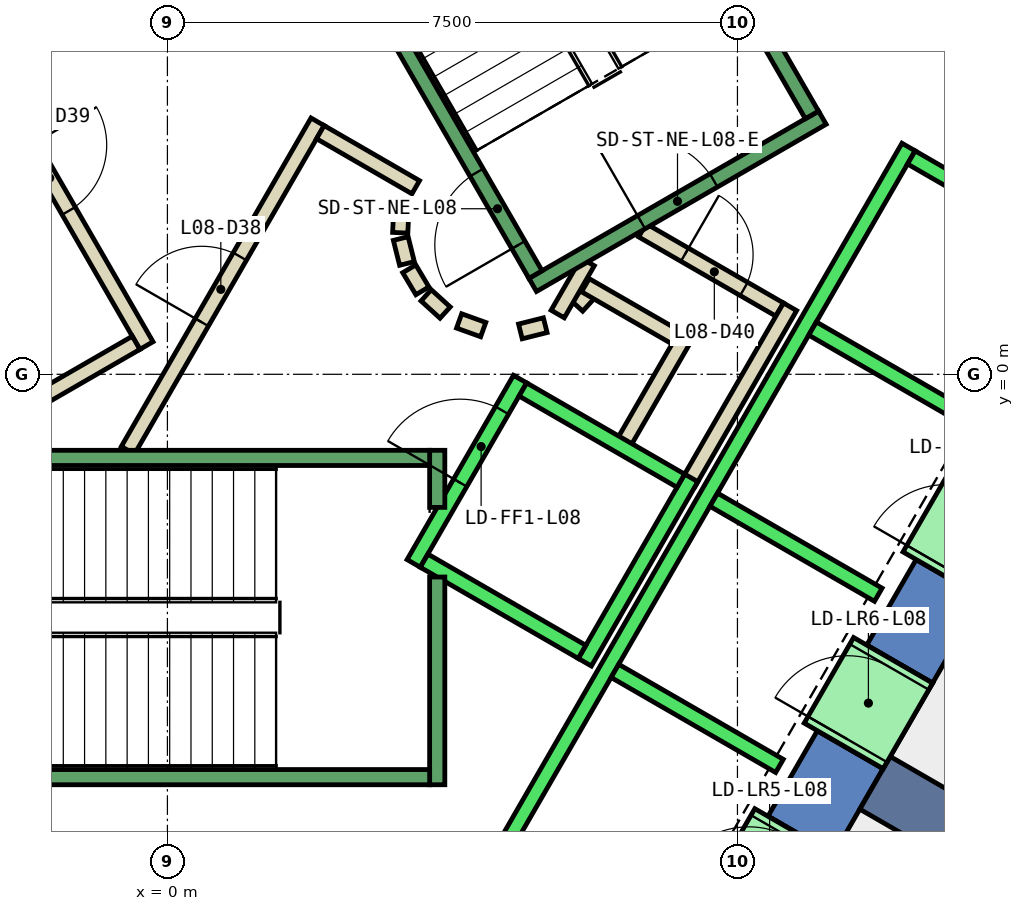
"""IFC4 building model, lengths in metres.
Left out: names, types, materials, properties, quantities, classifications, styles, units other than length and angle.
Written with IfcOpenShell. Run it as: python <this file> out.ifc"""

import sys

from ifc_helpers import new_model, si_unit, direction, frame, frame_2d, origin, place, context, subcontext, project, spatial, polyline, rectangle, outline, extrude, element, fill, save


model = new_model("IFC4")
c1 = context("Model", 3, precision=1e-05, world=origin(), true_north=direction((0.0, 1.0)))
c2 = subcontext(c1, "Body", "Model", "MODEL_VIEW")
j1 = project(units=[si_unit("LENGTHUNIT", "METRE"), si_unit("PLANEANGLEUNIT", "RADIAN")], contexts=[c1])
p1 = place(None, origin())
s1 = spatial("IfcSite", under=j1, at=p1, CompositionType="ELEMENT")
p2 = place(p1, origin())
s2 = spatial("IfcBuilding", under=s1, at=p2, CompositionType="ELEMENT")
p3 = place(p2, frame((0.0, 0.0, 43.4)))
s3 = spatial("IfcBuildingStorey", under=s2, at=p3, CompositionType="ELEMENT", Elevation=43.4)
p4 = place(p3, frame((0.0, 0.0, -0.4)))
e1 = element("IfcWall", 1, at=p4, inside=s3, PredefinedType="SHEAR", context=c2, shape_type="SweptSolid", body=[
    extrude(outline(polyline([(8.517, 11.748), (7.651, 11.248), (12.702, 2.5), (13.856, 2.5), (8.517, 11.748)])), origin(), (0.0, 0.0, 1.0), 4.2),
])
p5 = place(p3, frame((0.0, 0.0, -0.4)))
e2 = element("IfcWall", 2, at=p5, inside=s3, PredefinedType="SHEAR", context=c2, shape_type="SweptSolid", body=[
    extrude(outline(polyline([(9.417, -5.189), (8.551, -4.689), (7.902, -5.814), (8.767, -6.314), (9.417, -5.189)])), origin(), (0.0, 0.0, 1.0), 4.2),
])
p6 = place(p3, frame((0.0, 0.0, -0.4)))
e3 = element("IfcWall", 3, at=p6, inside=s3, PredefinedType="SHEAR", context=c2, shape_type="SweptSolid", body=[
    extrude(outline(polyline([(10.717, -2.937), (9.851, -2.437), (9.201, -3.563), (10.067, -4.063), (10.717, -2.937)])), origin(), (0.0, 0.0, 1.0), 4.2),
])
p7 = place(p3, frame((0.0, 0.0, 3.6)))
e4 = element("IfcWall", 4, at=p7, inside=s3, PredefinedType="SHEAR", context=c2, shape_type="SweptSolid", body=[
    extrude(outline(polyline([(8.767, -6.314), (7.902, -5.814), (7.252, -6.94), (8.117, -7.44), (8.767, -6.314)])), origin(), (0.0, 0.0, 1.0), 0.2),
])
p8 = place(p3, frame((0.0, 0.0, 3.6)))
e5 = element("IfcWall", 5, at=p8, inside=s3, PredefinedType="SHEAR", context=c2, shape_type="SweptSolid", body=[
    extrude(outline(polyline([(10.067, -4.063), (9.201, -3.563), (8.551, -4.689), (9.417, -5.189), (10.067, -4.063)])), origin(), (0.0, 0.0, 1.0), 0.2),
])
p9 = place(p3, frame((0.0, 0.0, 3.6)))
e6 = element("IfcWall", 6, at=p9, inside=s3, PredefinedType="SHEAR", context=c2, shape_type="SweptSolid", body=[
    extrude(outline(polyline([(11.367, -1.811), (10.501, -1.311), (9.851, -2.437), (10.717, -2.937), (11.367, -1.811)])), origin(), (0.0, 0.0, 1.0), 0.2),
])
p10 = place(p3, frame((9.31, -5.375, -0.4), z_axis=(0.0, 0.0, 1.0), x_axis=(0.866017533419, -0.500013631625, 0.0)))
e7 = element("IfcWall", 7, at=p10, inside=s3, PredefinedType="SHEAR", context=c2, shape_type="SweptSolid", body=[
    extrude(rectangle(XDim=9.0, YDim=0.8, at=frame_2d((4.5, 0.0))), origin(), (0.0, 0.0, 1.0), 4.2),
])
p11 = place(p3, frame((5.39, 0.898, 0.0), z_axis=(0.0, 0.0, 1.0), x_axis=(0.673828488714, 0.738887791073, 0.0)))
e8 = element("IfcWall", 8, at=p11, inside=s3, PredefinedType="PARTITIONING", context=c2, shape_type="SweptSolid", body=[
    extrude(rectangle(XDim=0.263, YDim=0.2, at=frame_2d((0.131, 0.0))), origin(), (0.0, 0.0, 1.0), 3.8),
])
p12 = place(p3, frame((5.499, 1.172, 0.0), z_axis=(0.0, 0.0, 1.0), x_axis=(0.866333505267, -0.499465972466, 0.0)))
e9 = element("IfcWall", 9, at=p12, inside=s3, PredefinedType="PARTITIONING", context=c2, shape_type="SweptSolid", body=[
    extrude(rectangle(XDim=1.374, YDim=0.2, at=frame_2d((0.687, 0.0))), origin(), (0.0, 0.0, 1.0), 3.8),
])
p13 = place(p3, frame((6.826, 0.522, 0.0), z_axis=(0.0, 0.0, 1.0), x_axis=(-0.500016722714, -0.866015748706, 0.0)))
e10 = element("IfcWall", 10, at=p13, inside=s3, PredefinedType="PARTITIONING", context=c2, shape_type="SweptSolid", body=[
    extrude(rectangle(XDim=1.7, YDim=0.2, at=frame_2d((0.85, 0.0))), origin(), (0.0, 0.0, 1.0), 3.8),
])
p14 = place(p3, frame((6.25, 1.894, 0.0), z_axis=(0.0, 0.0, 1.0), x_axis=(0.866043184279, -0.499969202016, 0.0)))
e11 = element("IfcWall", 11, at=p14, inside=s3, PredefinedType="PARTITIONING", context=c2, shape_type="SweptSolid", body=[
    extrude(rectangle(XDim=2.084, YDim=0.2, at=frame_2d((1.042, 0.0))), origin(), (0.0, 0.0, 1.0), 3.8),
])
p15 = place(p14, frame((0.642, 0.0, 0.0)))
e12 = element("IfcOpeningElement", 12, at=p15, cuts=e11, PredefinedType="OPENING", context=c2, shape_type="SweptSolid", body=[
    extrude(rectangle(XDim=0.9, YDim=2.1, at=frame_2d((0.45, 1.05))), frame((0.0, 0.11, 0.0), z_axis=(0.0, -1.0, 0.0), x_axis=(1.0, 0.0, 0.0)), (0.0, 0.0, 1.0), 0.22),
])
p16 = place(p3, frame((8.192, 0.888, 0.0), z_axis=(0.0, 0.0, 1.0), x_axis=(-0.499940625693, -0.866059680843, 0.0)))
e13 = element("IfcWall", 13, at=p16, inside=s3, PredefinedType="PARTITIONING", context=c2, shape_type="SweptSolid", body=[
    extrude(rectangle(XDim=2.68, YDim=0.2, at=frame_2d((1.34, 0.0))), origin(), (0.0, 0.0, 1.0), 3.8),
])
p17 = place(p3, frame((5.135, 0.793, 0.0), z_axis=(0.0, 0.0, 1.0), x_axis=(0.499526442893, 0.866298639529, 0.0)))
e14 = element("IfcWall", 14, at=p17, inside=s3, PredefinedType="PARTITIONING", context=c2, shape_type="SweptSolid", body=[
    extrude(rectangle(XDim=0.791, YDim=0.2, at=frame_2d((0.396, 0.0))), origin(), (0.0, 0.0, 1.0), 3.8),
])
p18 = place(p3, frame((-0.52, -1.0, 0.0), z_axis=(0.0, 0.0, 1.0), x_axis=(0.50011622646, 0.865958290007, 0.0)))
e15 = element("IfcWall", 15, at=p18, inside=s3, PredefinedType="PARTITIONING", context=c2, shape_type="SweptSolid", body=[
    extrude(rectangle(XDim=4.991, YDim=0.2, at=frame_2d((2.496, 0.0))), origin(), (0.0, 0.0, 1.0), 3.8),
])
p19 = place(p18, frame((1.945, 0.0, 0.0)))
e16 = element("IfcOpeningElement", 16, at=p19, cuts=e15, PredefinedType="OPENING", context=c2, shape_type="SweptSolid", body=[
    extrude(rectangle(XDim=1.0, YDim=2.1, at=frame_2d((0.5, 1.05))), frame((0.0, 0.11, 0.0), z_axis=(0.0, -1.0, 0.0), x_axis=(1.0, 0.0, 0.0)), (0.0, 0.0, 1.0), 0.22),
])
p20 = place(p3, frame((2.012, 3.186, 0.0), z_axis=(0.0, 0.0, 1.0), x_axis=(0.865891012941, -0.500232699559, 0.0)))
e17 = element("IfcWall", 17, at=p20, inside=s3, PredefinedType="PARTITIONING", context=c2, shape_type="SweptSolid", body=[
    extrude(rectangle(XDim=1.449, YDim=0.2, at=frame_2d((0.725, 0.0))), origin(), (0.0, 0.0, 1.0), 3.8),
])
p21 = place(p3, frame((3.079, 2.199, 0.0), z_axis=(0.0, 0.0, 1.0), x_axis=(-0.047771483479, -0.998858290933, 0.0)))
e18 = element("IfcWall", 18, at=p21, inside=s3, PredefinedType="PARTITIONING", context=c2, shape_type="SweptSolid", body=[
    extrude(rectangle(XDim=0.337, YDim=0.2, at=frame_2d((0.169, 0.0))), origin(), (0.0, 0.0, 1.0), 3.8),
])
p22 = place(p3, frame((3.07, 1.786, 0.0), z_axis=(0.0, 0.0, 1.0), x_axis=(0.242705583207, -0.970099994784, 0.0)))
e19 = element("IfcWall", 19, at=p22, inside=s3, PredefinedType="PARTITIONING", context=c2, shape_type="SweptSolid", body=[
    extrude(rectangle(XDim=0.338, YDim=0.2, at=frame_2d((0.169, 0.0))), origin(), (0.0, 0.0, 1.0), 3.8),
])
for number, where, z_axis, x_axis in (
    (20, (3.182, 1.388, 0.0), (0.0, 0.0, 1.0), (0.512, -0.859, 0.0)),
    (21, (3.404, 1.039, 0.0), (0.0, 0.0, 1.0), (0.74, -0.672, 0.0)),
):
    element("IfcWall", number, at=place(p3, frame(where, z_axis=z_axis, x_axis=x_axis)), inside=s3, PredefinedType="PARTITIONING", context=c2, shape_type="SweptSolid", body=[
        extrude(rectangle(XDim=0.338, YDim=0.2, at=frame_2d((0.169, 0.0))), origin(), (0.0, 0.0, 1.0), 3.8),
    ])
p23 = place(p3, frame((3.838, 0.702, 0.0), z_axis=(0.0, 0.0, 1.0), x_axis=(0.941035081519, -0.338308993895, 0.0)))
e22 = element("IfcWall", 22, at=p23, inside=s3, PredefinedType="PARTITIONING", context=c2, shape_type="SweptSolid", body=[
    extrude(rectangle(XDim=0.337, YDim=0.2, at=frame_2d((0.168, 0.0))), origin(), (0.0, 0.0, 1.0), 3.8),
])
p24 = place(p3, frame((4.644, 0.564, 0.0), z_axis=(0.0, 0.0, 1.0), x_axis=(0.969929076366, 0.243387729394, 0.0)))
e23 = element("IfcWall", 23, at=p24, inside=s3, PredefinedType="PARTITIONING", context=c2, shape_type="SweptSolid", body=[
    extrude(rectangle(XDim=0.337, YDim=0.2, at=frame_2d((0.168, 0.0))), origin(), (0.0, 0.0, 1.0), 3.8),
])
p25 = place(p3, frame((-2.771, 4.7, 0.0), z_axis=(0.0, 0.0, 1.0), x_axis=(0.499969479948, -0.866043023828, 0.0)))
e24 = element("IfcWall", 24, at=p25, inside=s3, PredefinedType="PARTITIONING", context=c2, shape_type="SweptSolid", body=[
    extrude(rectangle(XDim=4.99, YDim=0.2, at=frame_2d((2.495, 0.0))), origin(), (0.0, 0.0, 1.0), 3.8),
])
p26 = place(p25, frame((1.945, 0.0, 0.0)))
e25 = element("IfcOpeningElement", 25, at=p26, cuts=e24, PredefinedType="OPENING", context=c2, shape_type="SweptSolid", body=[
    extrude(rectangle(XDim=1.0, YDim=2.1, at=frame_2d((0.5, 1.05))), frame((0.0, 0.11, 0.0), z_axis=(0.0, -1.0, 0.0), x_axis=(1.0, 0.0, 0.0)), (0.0, 0.0, 1.0), 0.22),
])
p27 = place(p3, frame((-0.412, 0.414, 0.0), z_axis=(0.0, 0.0, 1.0), x_axis=(-0.866017369001, -0.500013916395, 0.0)))
e26 = element("IfcWall", 26, at=p27, inside=s3, PredefinedType="PARTITIONING", context=c2, shape_type="SweptSolid", body=[
    extrude(rectangle(XDim=1.45, YDim=0.2, at=frame_2d((0.725, 0.0))), origin(), (0.0, 0.0, 1.0), 3.8),
])
p28 = place(p3, frame((3.24, -2.488, 0.0), z_axis=(0.0, 0.0, 1.0), x_axis=(0.49994636267, 0.866056369097, 0.0)))
e27 = element("IfcWall", 27, at=p28, inside=s3, PredefinedType="STANDARD", context=c2, shape_type="SweptSolid", body=[
    extrude(rectangle(XDim=2.8, YDim=0.2, at=frame_2d((1.4, 0.0))), origin(), (0.0, 0.0, 1.0), 3.8),
])
p29 = place(p28, frame((1.225, 0.0, 0.0)))
e28 = element("IfcOpeningElement", 28, at=p29, cuts=e27, PredefinedType="OPENING", context=c2, shape_type="SweptSolid", body=[
    extrude(rectangle(XDim=1.1, YDim=2.1, at=frame_2d((0.55, 1.05))), frame((0.0, 0.11, 0.0), z_axis=(0.0, -1.0, 0.0), x_axis=(1.0, 0.0, 0.0)), (0.0, 0.0, 1.0), 0.22),
])
p30 = place(p3, frame((5.492, -3.788, 0.0), z_axis=(0.0, 0.0, 1.0), x_axis=(0.500011755427, 0.866018616679, 0.0)))
e29 = element("IfcWall", 29, at=p30, inside=s3, PredefinedType="STANDARD", context=c2, shape_type="SweptSolid", body=[
    extrude(rectangle(XDim=2.8, YDim=0.2, at=frame_2d((1.4, 0.0))), origin(), (0.0, 0.0, 1.0), 3.8),
])
p31 = place(p3, frame((3.377, -2.452, 0.0), z_axis=(0.0, 0.0, 1.0), x_axis=(0.865955154139, -0.50012165622, 0.0)))
e30 = element("IfcWall", 30, at=p31, inside=s3, PredefinedType="STANDARD", context=c2, shape_type="SweptSolid", body=[
    extrude(rectangle(XDim=2.4, YDim=0.2, at=frame_2d((1.2, 0.0))), origin(), (0.0, 0.0, 1.0), 3.8),
])
p32 = place(p3, frame((4.677, -0.2, 0.0), z_axis=(0.0, 0.0, 1.0), x_axis=(0.865973769406, -0.500089422704, 0.0)))
e31 = element("IfcWall", 31, at=p32, inside=s3, PredefinedType="STANDARD", context=c2, shape_type="SweptSolid", body=[
    extrude(rectangle(XDim=2.399, YDim=0.2, at=frame_2d((1.2, 0.0))), origin(), (0.0, 0.0, 1.0), 3.8),
])
p33 = place(p3, frame((4.451, -6.19, 0.0), z_axis=(0.0, 0.0, 1.0), x_axis=(0.50000090737, 0.866024879913, 0.0)))
e32 = element("IfcWall", 32, at=p33, inside=s3, PredefinedType="STANDARD", context=c2, shape_type="SweptSolid", body=[
    extrude(rectangle(XDim=10.6, YDim=0.2, at=frame_2d((5.3, 0.0))), origin(), (0.0, 0.0, 1.0), 3.8),
])
for number, where, z_axis, x_axis in (
    (33, (5.888, -3.902, 0.0), (0.0, 0.0, 1.0), (0.866, -0.5, 0.0)),
    (34, (7.188, -1.65, 0.0), (0.0, 0.0, 1.0), (0.866, -0.5, 0.0)),
    (35, (8.488, 0.602, 0.0), (0.0, 0.0, 1.0), (0.866, -0.5, 0.0)),
):
    element("IfcWall", number, at=place(p3, frame(where, z_axis=z_axis, x_axis=x_axis)), inside=s3, PredefinedType="STANDARD", context=c2, shape_type="SweptSolid", body=[
        extrude(rectangle(XDim=2.5, YDim=0.2, at=frame_2d((1.25, 0.0))), origin(), (0.0, 0.0, 1.0), 3.8),
    ])
p34 = place(p3, frame((9.788, 2.853, 0.0), z_axis=(0.0, 0.0, 1.0), x_axis=(0.865998541277, -0.500046524342, 0.0)))
e36 = element("IfcWall", 36, at=p34, inside=s3, PredefinedType="STANDARD", context=c2, shape_type="SweptSolid", body=[
    extrude(rectangle(XDim=2.5, YDim=0.2, at=frame_2d((1.25, 0.0))), origin(), (0.0, 0.0, 1.0), 3.8),
])
p35 = place(p3, frame((7.598, -7.14, 0.0), z_axis=(0.0, 0.0, 1.0), x_axis=(0.500362116554, 0.865816234728, 0.0)))
e37 = element("IfcWall", 37, at=p35, inside=s3, PredefinedType="STANDARD", context=c2, shape_type="SweptSolid", body=[
    extrude(rectangle(XDim=1.299, YDim=1.2, at=frame_2d((0.65, 0.0))), origin(), (0.0, 0.0, 1.0), 2.4),
])
p36 = place(p35, frame((0.1, 0.0, 0.0)))
e38 = element("IfcOpeningElement", 38, at=p36, cuts=e37, PredefinedType="OPENING", context=c2, shape_type="SweptSolid", body=[
    extrude(rectangle(XDim=1.1, YDim=2.3, at=frame_2d((0.55, 1.15))), frame((0.0, 0.61, 0.0), z_axis=(0.0, -1.0, 0.0), x_axis=(1.0, 0.0, 0.0)), (0.0, 0.0, 1.0), 1.22),
])
p37 = place(p3, frame((8.898, -4.889, 0.0), z_axis=(0.0, 0.0, 1.0), x_axis=(0.500036693733, 0.866004217611, 0.0)))
e39 = element("IfcWall", 39, at=p37, inside=s3, PredefinedType="STANDARD", context=c2, shape_type="SweptSolid", body=[
    extrude(rectangle(XDim=1.3, YDim=1.2, at=frame_2d((0.65, 0.0))), origin(), (0.0, 0.0, 1.0), 2.4),
])
p38 = place(p37, frame((0.1, 0.0, 0.0)))
e40 = element("IfcOpeningElement", 40, at=p38, cuts=e39, PredefinedType="OPENING", context=c2, shape_type="SweptSolid", body=[
    extrude(rectangle(XDim=1.1, YDim=2.3, at=frame_2d((0.55, 1.15))), frame((0.0, 0.61, 0.0), z_axis=(0.0, -1.0, 0.0), x_axis=(1.0, 0.0, 0.0)), (0.0, 0.0, 1.0), 1.22),
])
p39 = place(p3, frame((10.198, -2.637, 0.0), z_axis=(0.0, 0.0, 1.0), x_axis=(0.49989585183, 0.866085525409, 0.0)))
e41 = element("IfcWall", 41, at=p39, inside=s3, PredefinedType="STANDARD", context=c2, shape_type="SweptSolid", body=[
    extrude(rectangle(XDim=1.3, YDim=1.2, at=frame_2d((0.65, 0.0))), origin(), (0.0, 0.0, 1.0), 2.4),
])
p40 = place(p39, frame((0.1, 0.0, 0.0)))
e42 = element("IfcOpeningElement", 42, at=p40, cuts=e41, PredefinedType="OPENING", context=c2, shape_type="SweptSolid", body=[
    extrude(rectangle(XDim=1.1, YDim=2.3, at=frame_2d((0.55, 1.15))), frame((0.0, 0.61, 0.0), z_axis=(0.0, -1.0, 0.0), x_axis=(1.0, 0.0, 0.0)), (0.0, 0.0, 1.0), 1.22),
])
p41 = place(p3, frame((3.55, -2.667, 0.0), z_axis=(0.0, 0.0, 1.0), x_axis=(0.0, -1.0, 0.0)))
e43 = element("IfcWall", 43, at=p41, inside=s3, PredefinedType="STANDARD", context=c2, shape_type="SweptSolid", body=[
    extrude(rectangle(XDim=2.733, YDim=0.2, at=frame_2d((1.366, 0.0))), origin(), (0.0, 0.0, 1.0), 3.8),
])
p42 = place(p3, frame((3.55, -1.0, 0.0), z_axis=(0.0, 0.0, 1.0), x_axis=(0.0, -1.0, 0.0)))
e44 = element("IfcWall", 44, at=p42, inside=s3, PredefinedType="STANDARD", context=c2, shape_type="SweptSolid", body=[
    extrude(rectangle(XDim=0.751, YDim=0.2, at=frame_2d((0.375, 0.0))), origin(), (0.0, 0.0, 1.0), 3.8),
])
p43 = place(p3, frame((-3.45, -1.1, 0.0), z_axis=(0.0, 0.0, 1.0), x_axis=(1.0, 0.0, 0.0)))
e45 = element("IfcWall", 45, at=p43, inside=s3, PredefinedType="STANDARD", context=c2, shape_type="SweptSolid", body=[
    extrude(rectangle(XDim=6.9, YDim=0.2, at=frame_2d((3.45, 0.0))), origin(), (0.0, 0.0, 1.0), 3.8),
])
p44 = place(p43, frame((0.45, 0.0, 0.0)))
e46 = element("IfcOpeningElement", 46, at=p44, cuts=e45, PredefinedType="OPENING", context=c2, shape_type="SweptSolid", body=[
    extrude(rectangle(XDim=1.1, YDim=2.2, at=frame_2d((0.55, 1.1))), frame((0.0, 0.11, 0.0), z_axis=(0.0, -1.0, 0.0), x_axis=(1.0, 0.0, 0.0)), (0.0, 0.0, 1.0), 0.22),
])
p45 = place(p3, frame((-3.45, -5.3, 0.0), z_axis=(0.0, 0.0, 1.0), x_axis=(1.0, 0.0, 0.0)))
e47 = element("IfcWall", 47, at=p45, inside=s3, PredefinedType="STANDARD", context=c2, shape_type="SweptSolid", body=[
    extrude(rectangle(XDim=6.9, YDim=0.2, at=frame_2d((3.45, 0.0))), origin(), (0.0, 0.0, 1.0), 3.8),
])
p46 = place(p3, frame((4.806, 1.176, 0.0), z_axis=(0.0, 0.0, 1.0), x_axis=(0.866059941101, 0.499940174841, 0.0)))
e48 = element("IfcWall", 48, at=p46, inside=s3, PredefinedType="STANDARD", context=c2, shape_type="SweptSolid", body=[
    extrude(rectangle(XDim=4.4, YDim=0.2, at=frame_2d((2.2, 0.0))), origin(), (0.0, 0.0, 1.0), 3.8),
])
p47 = place(p46, frame((1.65, 0.0, 0.0)))
e49 = element("IfcOpeningElement", 49, at=p47, cuts=e48, PredefinedType="OPENING", context=c2, shape_type="SweptSolid", body=[
    extrude(rectangle(XDim=1.1, YDim=2.2, at=frame_2d((0.55, 1.1))), frame((0.0, 0.11, 0.0), z_axis=(0.0, -1.0, 0.0), x_axis=(1.0, 0.0, 0.0)), (0.0, 0.0, 1.0), 0.22),
])
p48 = place(p3, frame((4.843, 1.312, 0.0), z_axis=(0.0, 0.0, 1.0), x_axis=(-0.499963383562, 0.866046543262, 0.0)))
e50 = element("IfcWall", 50, at=p48, inside=s3, PredefinedType="STANDARD", context=c2, shape_type="SweptSolid", body=[
    extrude(rectangle(XDim=6.9, YDim=0.2, at=frame_2d((3.45, 0.0))), origin(), (0.0, 0.0, 1.0), 3.8),
])
p49 = place(p48, frame((0.45, 0.0, 0.0)))
e51 = element("IfcOpeningElement", 51, at=p49, cuts=e50, PredefinedType="OPENING", context=c2, shape_type="SweptSolid", body=[
    extrude(rectangle(XDim=1.1, YDim=2.2, at=frame_2d((0.55, 1.1))), frame((0.0, 0.11, 0.0), z_axis=(0.0, -1.0, 0.0), x_axis=(1.0, 0.0, 0.0)), (0.0, 0.0, 1.0), 0.22),
])
p50 = place(p3, frame((8.48, 3.412, 0.0), z_axis=(0.0, 0.0, 1.0), x_axis=(-0.499978703459, 0.866037698999, 0.0)))
e52 = element("IfcWall", 52, at=p50, inside=s3, PredefinedType="STANDARD", context=c2, shape_type="SweptSolid", body=[
    extrude(rectangle(XDim=6.9, YDim=0.2, at=frame_2d((3.45, 0.0))), origin(), (0.0, 0.0, 1.0), 3.8),
])
p51 = place(p3, frame((-1.393, 7.288, 0.0), z_axis=(0.0, 0.0, 1.0), x_axis=(-0.499963383562, -0.866046543262, 0.0)))
e53 = element("IfcWall", 53, at=p51, inside=s3, PredefinedType="STANDARD", context=c2, shape_type="SweptSolid", body=[
    extrude(rectangle(XDim=6.9, YDim=0.2, at=frame_2d((3.45, 0.0))), origin(), (0.0, 0.0, 1.0), 3.8),
])
p52 = place(p51, frame((0.45, 0.0, 0.0)))
e54 = element("IfcOpeningElement", 54, at=p52, cuts=e53, PredefinedType="OPENING", context=c2, shape_type="SweptSolid", body=[
    extrude(rectangle(XDim=1.1, YDim=2.2, at=frame_2d((0.55, 1.1))), frame((0.0, 0.11, 0.0), z_axis=(0.0, -1.0, 0.0), x_axis=(1.0, 0.0, 0.0)), (0.0, 0.0, 1.0), 0.22),
])
p53 = place(p19, origin())
e55 = element("IfcDoor", 55, at=p53, inside=s3, OperationType="SINGLE_SWING_LEFT", PredefinedType="DOOR", context=c2, shape_type="SweptSolid", body=[
    extrude(rectangle(XDim=1.0, YDim=2.1, at=frame_2d((0.5, 1.05))), frame((0.0, 0.025, 0.0), z_axis=(0.0, -1.0, 0.0), x_axis=(1.0, 0.0, 0.0)), (0.0, 0.0, 1.0), 0.05),
])
fill(e16, e55)
p54 = place(p26, origin())
e56 = element("IfcDoor", 56, at=p54, inside=s3, OperationType="SINGLE_SWING_RIGHT", PredefinedType="DOOR", context=c2, shape_type="SweptSolid", body=[
    extrude(rectangle(XDim=1.0, YDim=2.1, at=frame_2d((0.5, 1.05))), frame((0.0, 0.025, 0.0), z_axis=(0.0, -1.0, 0.0), x_axis=(1.0, 0.0, 0.0)), (0.0, 0.0, 1.0), 0.05),
])
fill(e25, e56)
p55 = place(p15, origin())
e57 = element("IfcDoor", 57, at=p55, inside=s3, OperationType="SINGLE_SWING_LEFT", PredefinedType="DOOR", context=c2, shape_type="SweptSolid", body=[
    extrude(rectangle(XDim=0.9, YDim=2.1, at=frame_2d((0.45, 1.05))), frame((0.0, 0.025, 0.0), z_axis=(0.0, -1.0, 0.0), x_axis=(1.0, 0.0, 0.0)), (0.0, 0.0, 1.0), 0.05),
])
fill(e12, e57)
p56 = place(p38, origin())
e58 = element("IfcDoor", 58, at=p56, inside=s3, OperationType="SLIDING_TO_LEFT", PredefinedType="DOOR", context=c2, shape_type="SweptSolid", body=[
    extrude(rectangle(XDim=1.1, YDim=2.3, at=frame_2d((0.55, 1.15))), frame((0.0, 0.025, 0.0), z_axis=(0.0, -1.0, 0.0), x_axis=(1.0, 0.0, 0.0)), (0.0, 0.0, 1.0), 0.05),
])
fill(e40, e58)
p57 = place(p29, origin())
e59 = element("IfcDoor", 59, at=p57, inside=s3, OperationType="SLIDING_TO_LEFT", PredefinedType="DOOR", context=c2, shape_type="SweptSolid", body=[
    extrude(rectangle(XDim=1.1, YDim=2.1, at=frame_2d((0.55, 1.05))), frame((0.0, 0.025, 0.0), z_axis=(0.0, -1.0, 0.0), x_axis=(1.0, 0.0, 0.0)), (0.0, 0.0, 1.0), 0.05),
])
fill(e28, e59)
p58 = place(p49, origin())
e60 = element("IfcDoor", 60, at=p58, inside=s3, OperationType="SINGLE_SWING_LEFT", PredefinedType="DOOR", context=c2, shape_type="SweptSolid", body=[
    extrude(rectangle(XDim=1.1, YDim=2.2, at=frame_2d((0.55, 1.1))), frame((0.0, 0.025, 0.0), z_axis=(0.0, -1.0, 0.0), x_axis=(1.0, 0.0, 0.0)), (0.0, 0.0, 1.0), 0.05),
])
fill(e51, e60)
p59 = place(p47, origin())
e61 = element("IfcDoor", 61, at=p59, inside=s3, OperationType="SINGLE_SWING_LEFT", PredefinedType="DOOR", context=c2, shape_type="SweptSolid", body=[
    extrude(rectangle(XDim=1.1, YDim=2.2, at=frame_2d((0.55, 1.1))), frame((0.0, 0.025, 0.0), z_axis=(0.0, -1.0, 0.0), x_axis=(1.0, 0.0, 0.0)), (0.0, 0.0, 1.0), 0.05),
])
fill(e49, e61)
save(model, sys.argv[1])
